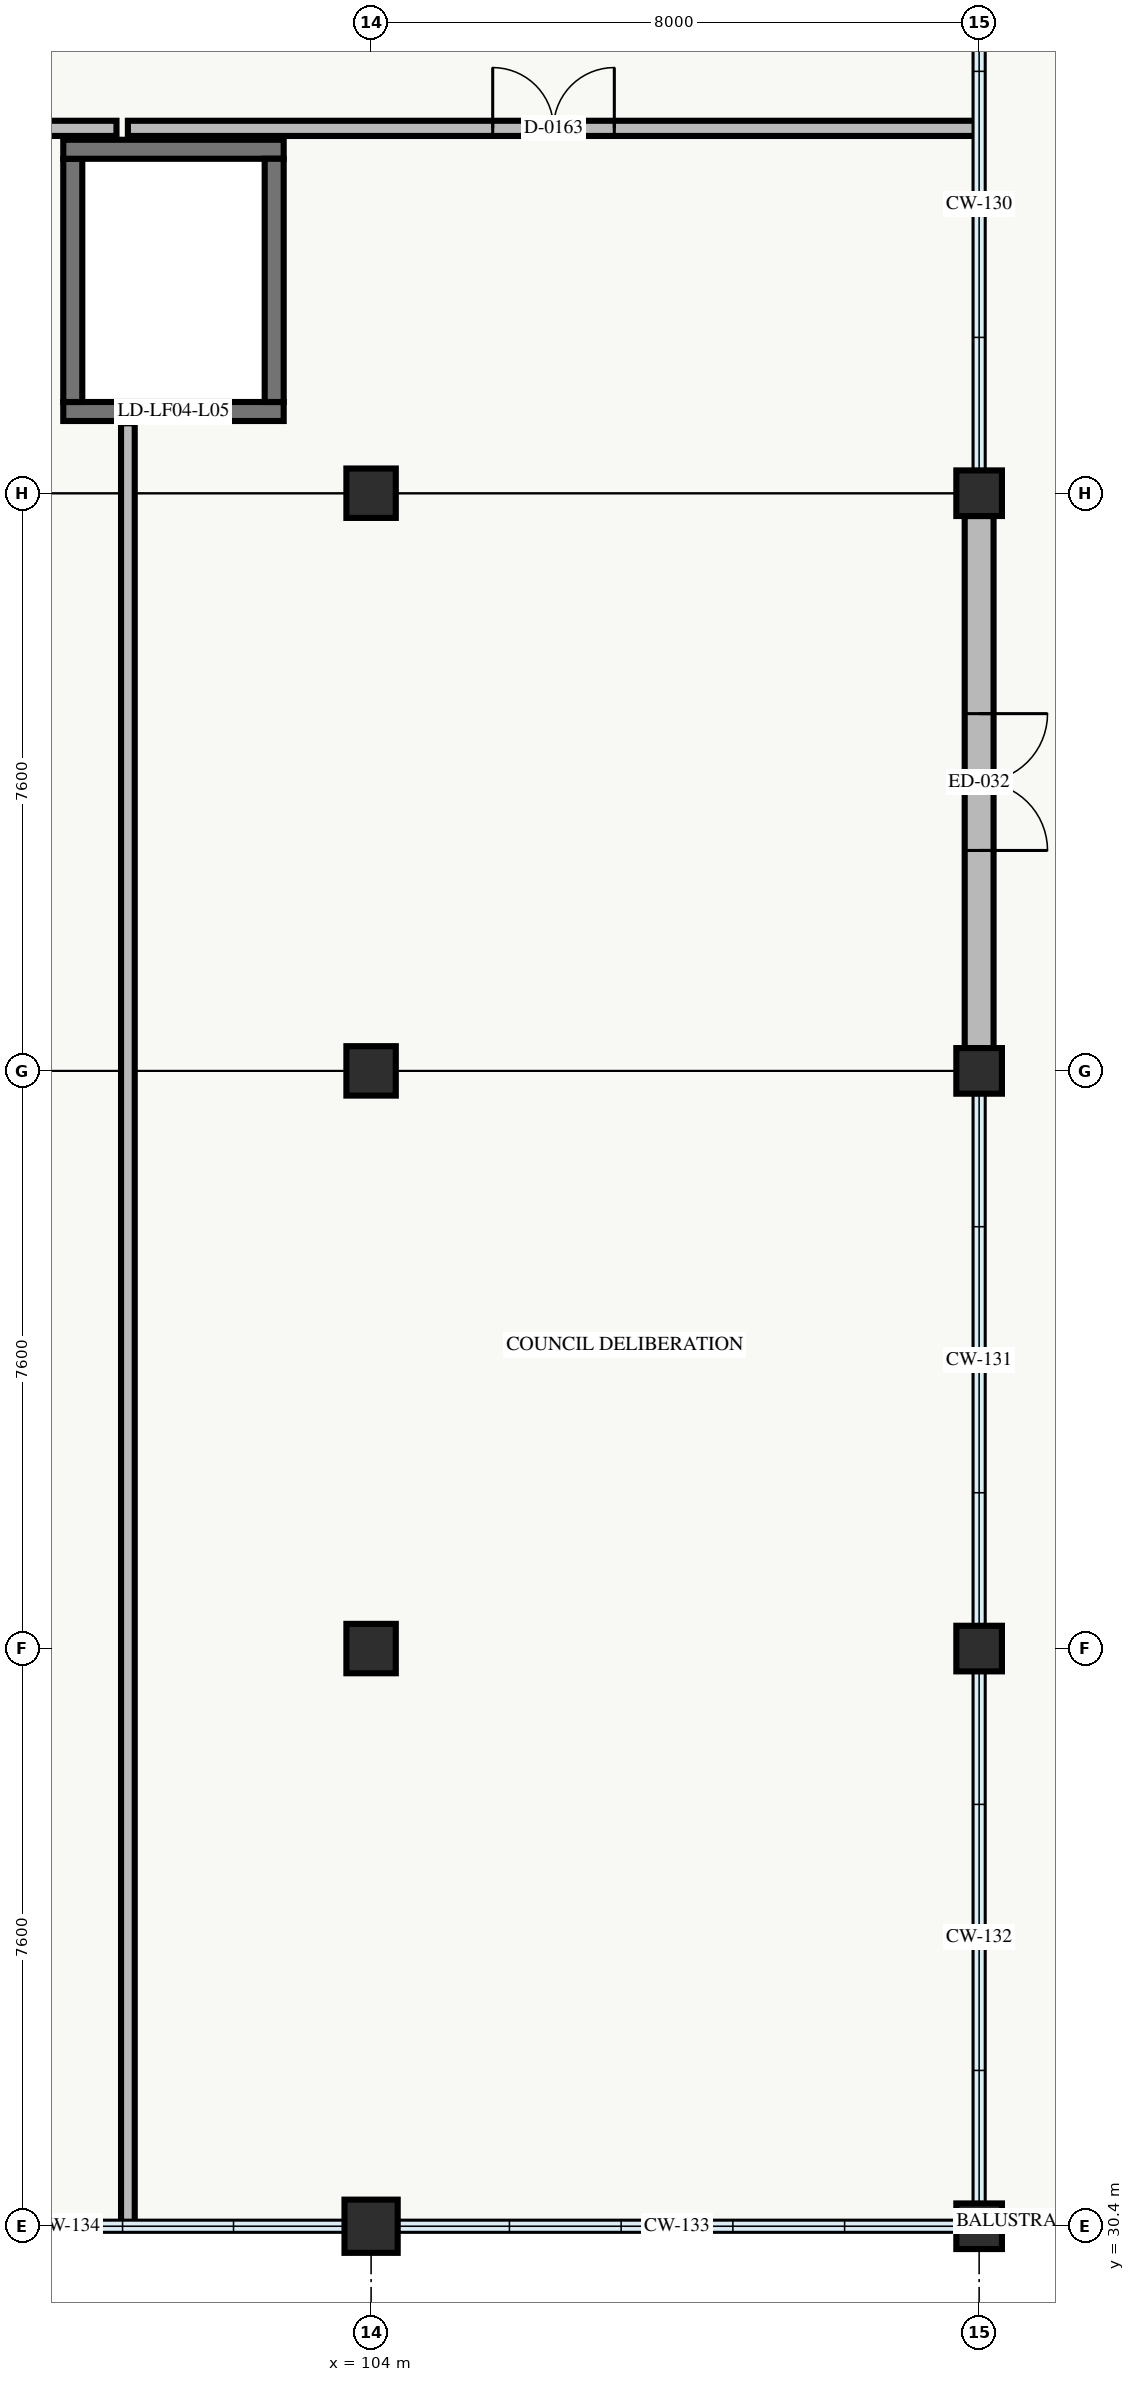
"""IFC4 building model, lengths in metres.
Left out: names, types, materials, properties, quantities, classifications, styles, units other than length and angle.
Written with IfcOpenShell. Run it as: python <this file> out.ifc"""

import sys

from ifc_helpers import new_model, si_unit, direction, frame, frame_2d, origin, origin_2d, place, context, subcontext, project, spatial, rectangle, extrude, element, fill, save


model = new_model("IFC4")
c1 = context("Model", 3, precision=1e-05, world=origin(), true_north=direction((0.0, 1.0)))
c2 = subcontext(c1, "Body", "Model", "MODEL_VIEW")
j1 = project(units=[si_unit("LENGTHUNIT", "METRE"), si_unit("PLANEANGLEUNIT", "RADIAN")], contexts=[c1])
p1 = place(None, origin())
s1 = spatial("IfcSite", under=j1, at=p1, CompositionType="ELEMENT")
p2 = place(p1, origin())
s2 = spatial("IfcBuilding", under=s1, at=p2, CompositionType="ELEMENT")
p3 = place(p2, frame((0.0, 0.0, 18.9)))
s3 = spatial("IfcBuildingStorey", under=s2, at=p3, CompositionType="ELEMENT", Elevation=18.9)
p4 = place(p3, frame((104.0, 30.4, 0.0), z_axis=(0.0, 0.0, 1.0), x_axis=(1.0, 0.0, 0.0)))
e1 = element("IfcColumn", 1, at=p4, inside=s3, PredefinedType="COLUMN", context=c2, shape_type="SweptSolid", body=[
    extrude(rectangle(XDim=0.7, YDim=0.7, at=origin_2d()), origin(), (0.0, 0.0, 1.0), 4.8),
])
for number, where, z_axis, x_axis in (
    (2, (104.0, 38.0, 0.0), (0.0, 0.0, 1.0), (1.0, 0.0, 0.0)),
    (3, (104.0, 45.6, 0.0), (0.0, 0.0, 1.0), (1.0, 0.0, 0.0)),
    (4, (104.0, 53.2, 0.0), (0.0, 0.0, 1.0), (1.0, 0.0, 0.0)),
):
    element("IfcColumn", number, at=place(p3, frame(where, z_axis=z_axis, x_axis=x_axis)), inside=s3, PredefinedType="COLUMN", context=c2, shape_type="SweptSolid", body=[
        extrude(rectangle(XDim=0.65, YDim=0.65, at=origin_2d()), origin(), (0.0, 0.0, 1.0), 4.8),
    ])
for number, where, z_axis, x_axis in (
    (5, (112.0, 30.4, 0.0), (0.0, 0.0, 1.0), (1.0, 0.0, 0.0)),
    (6, (112.0, 38.0, 0.0), (0.0, 0.0, 1.0), (1.0, 0.0, 0.0)),
    (7, (112.0, 45.6, 0.0), (0.0, 0.0, 1.0), (1.0, 0.0, 0.0)),
    (8, (112.0, 53.2, 0.0), (0.0, 0.0, 1.0), (1.0, 0.0, 0.0)),
):
    element("IfcColumn", number, at=place(p3, frame(where, z_axis=z_axis, x_axis=x_axis)), inside=s3, PredefinedType="COLUMN", context=c2, shape_type="SweptSolid", body=[
        extrude(rectangle(XDim=0.6, YDim=0.6, at=origin_2d()), origin(), (0.0, 0.0, 1.0), 4.8),
    ])
p5 = place(p3, frame((112.0, 52.9, 0.0), z_axis=(0.0, 0.0, 1.0), x_axis=(0.0, -1.0, 0.0)))
e9 = element("IfcWall", 9, at=p5, inside=s3, PredefinedType="STANDARD", context=c2, shape_type="SweptSolid", body=[
    extrude(rectangle(XDim=7.0, YDim=0.38, at=frame_2d((3.5, 0.0))), origin(), (0.0, 0.0, 1.0), 3.97),
])
p6 = place(p5, frame((2.6, 0.0, 0.0)))
e10 = element("IfcOpeningElement", 10, at=p6, cuts=e9, PredefinedType="OPENING", context=c2, shape_type="SweptSolid", body=[
    extrude(rectangle(XDim=1.8, YDim=2.4, at=frame_2d((0.9, 1.2))), frame((0.0, 0.2, 0.0), z_axis=(0.0, -1.0, 0.0), x_axis=(1.0, 0.0, 0.0)), (0.0, 0.0, 1.0), 0.4),
])
p7 = place(p3, frame((102.85, 54.275, 0.0), z_axis=(0.0, 0.0, 1.0), x_axis=(-1.0, 0.0, 0.0)))
e11 = element("IfcWall", 11, at=p7, inside=s3, PredefinedType="SHEAR", context=c2, shape_type="SweptSolid", body=[
    extrude(rectangle(XDim=2.9, YDim=0.25, at=frame_2d((1.45, 0.0))), origin(), (0.0, 0.0, 1.0), 4.8),
])
p8 = place(p7, frame((0.9, 0.0, 0.0)))
e12 = element("IfcOpeningElement", 12, at=p8, cuts=e11, PredefinedType="OPENING", context=c2, shape_type="SweptSolid", body=[
    extrude(rectangle(XDim=1.1, YDim=2.15, at=frame_2d((0.55, 1.075))), frame((0.0, 0.135, 0.0), z_axis=(0.0, -1.0, 0.0), x_axis=(1.0, 0.0, 0.0)), (0.0, 0.0, 1.0), 0.27),
])
p9 = place(p3, frame((100.075, 54.4, 0.0), z_axis=(0.0, 0.0, 1.0), x_axis=(0.0, 1.0, 0.0)))
e13 = element("IfcWall", 13, at=p9, inside=s3, PredefinedType="SHEAR", context=c2, shape_type="SweptSolid", body=[
    extrude(rectangle(XDim=3.2, YDim=0.25, at=frame_2d((1.6, 0.0))), origin(), (0.0, 0.0, 1.0), 4.8),
])
p10 = place(p3, frame((99.95, 57.725, 0.0), z_axis=(0.0, 0.0, 1.0), x_axis=(1.0, 0.0, 0.0)))
e14 = element("IfcWall", 14, at=p10, inside=s3, PredefinedType="SHEAR", context=c2, shape_type="SweptSolid", body=[
    extrude(rectangle(XDim=2.9, YDim=0.25, at=frame_2d((1.45, 0.0))), origin(), (0.0, 0.0, 1.0), 4.8),
])
p11 = place(p3, frame((102.725, 57.6, 0.0), z_axis=(0.0, 0.0, 1.0), x_axis=(0.0, -1.0, 0.0)))
e15 = element("IfcWall", 15, at=p11, inside=s3, PredefinedType="SHEAR", context=c2, shape_type="SweptSolid", body=[
    extrude(rectangle(XDim=3.2, YDim=0.25, at=frame_2d((1.6, 0.0))), origin(), (0.0, 0.0, 1.0), 4.8),
])
p12 = place(p3, frame((100.8, 30.4, 0.0), z_axis=(0.0, 0.0, 1.0), x_axis=(0.0, 1.0, 0.0)))
e16 = element("IfcWall", 16, at=p12, inside=s3, PredefinedType="PARTITIONING", context=c2, shape_type="SweptSolid", body=[
    extrude(rectangle(XDim=23.72, YDim=0.18, at=frame_2d((11.86, 0.0))), origin(), (0.0, 0.0, 1.0), 2.77),
])
p13 = place(p3, frame((100.8, 58.0, 0.0), z_axis=(0.0, 0.0, 1.0), x_axis=(1.0, 0.0, 0.0)))
e17 = element("IfcWall", 17, at=p13, inside=s3, PredefinedType="STANDARD", context=c2, shape_type="SweptSolid", body=[
    extrude(rectangle(XDim=11.2, YDim=0.2, at=frame_2d((5.6, 0.0))), origin(), (0.0, 0.0, 1.0), 4.52),
])
p14 = place(p13, frame((4.8, 0.0, 0.0)))
e18 = element("IfcOpeningElement", 18, at=p14, cuts=e17, PredefinedType="OPENING", context=c2, shape_type="SweptSolid", body=[
    extrude(rectangle(XDim=1.6, YDim=2.3, at=frame_2d((0.8, 1.15))), frame((0.0, 0.11, 0.0), z_axis=(0.0, -1.0, 0.0), x_axis=(1.0, 0.0, 0.0)), (0.0, 0.0, 1.0), 0.22),
])
p15 = place(p3, frame((67.35, 58.0, 0.0), z_axis=(0.0, 0.0, 1.0), x_axis=(1.0, 0.0, 0.0)))
e19 = element("IfcWall", 19, at=p15, inside=s3, PredefinedType="STANDARD", context=c2, shape_type="SweptSolid", body=[
    extrude(rectangle(XDim=33.3, YDim=0.2, at=frame_2d((16.65, 0.0))), origin(), (0.0, 0.0, 1.0), 2.77),
])
p16 = place(p15, frame((16.125, 0.0, 0.0)))
e20 = element("IfcOpeningElement", 20, at=p16, cuts=e19, PredefinedType="OPENING", context=c2, shape_type="SweptSolid", body=[
    extrude(rectangle(XDim=1.05, YDim=2.15, at=frame_2d((0.525, 1.075))), frame((0.0, 0.11, 0.0), z_axis=(0.0, -1.0, 0.0), x_axis=(1.0, 0.0, 0.0)), (0.0, 0.0, 1.0), 0.22),
])
p17 = place(p6, origin())
e21 = element("IfcDoor", 21, at=p17, inside=s3, OperationType="DOUBLE_DOOR_SINGLE_SWING", PredefinedType="DOOR", context=c2, shape_type="SweptSolid", body=[
    extrude(rectangle(XDim=1.8, YDim=2.4, at=frame_2d((0.9, 1.2))), frame((0.0, 0.025, 0.0), z_axis=(0.0, -1.0, 0.0), x_axis=(1.0, 0.0, 0.0)), (0.0, 0.0, 1.0), 0.05),
])
fill(e10, e21)
p18 = place(p8, origin())
e22 = element("IfcDoor", 22, at=p18, inside=s3, OperationType="DOUBLE_DOOR_SLIDING", PredefinedType="DOOR", context=c2, shape_type="SweptSolid", body=[
    extrude(rectangle(XDim=1.1, YDim=2.15, at=frame_2d((0.55, 1.075))), frame((0.0, 0.025, 0.0), z_axis=(0.0, -1.0, 0.0), x_axis=(1.0, 0.0, 0.0)), (0.0, 0.0, 1.0), 0.05),
])
fill(e12, e22)
p19 = place(p14, origin())
e23 = element("IfcDoor", 23, at=p19, inside=s3, OperationType="DOUBLE_DOOR_SINGLE_SWING", PredefinedType="DOOR", context=c2, shape_type="SweptSolid", body=[
    extrude(rectangle(XDim=1.6, YDim=2.3, at=frame_2d((0.8, 1.15))), frame((0.0, 0.025, 0.0), z_axis=(0.0, -1.0, 0.0), x_axis=(1.0, 0.0, 0.0)), (0.0, 0.0, 1.0), 0.05),
])
fill(e18, e23)
save(model, sys.argv[1])
